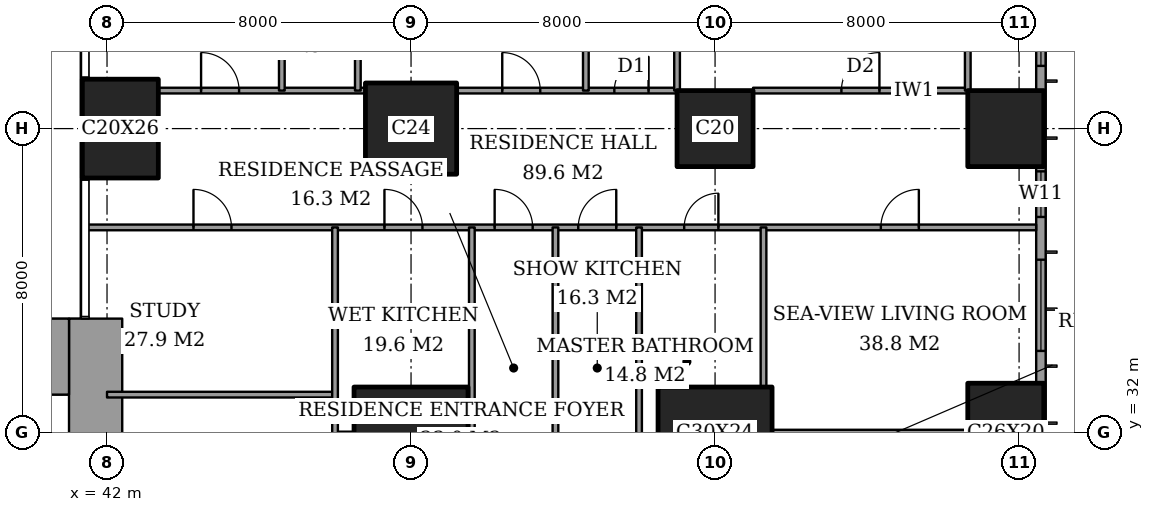
"""IFC4 building model, lengths in metres.
Left out: names, types, materials, properties, quantities, classifications, styles, units other than length and angle.
Written with IfcOpenShell. Run it as: python <this file> out.ifc"""

import sys

from ifc_helpers import new_model, si_unit, direction, frame, frame_2d, origin, origin_2d, place, context, subcontext, project, spatial, rectangle, extrude, element, fill, save


model = new_model("IFC4")
c1 = context("Model", 3, precision=1e-05, world=origin(), true_north=direction((0.0, 1.0)))
c2 = subcontext(c1, "Body", "Model", "MODEL_VIEW")
j1 = project(units=[si_unit("LENGTHUNIT", "METRE"), si_unit("PLANEANGLEUNIT", "RADIAN")], contexts=[c1])
p1 = place(None, origin())
s1 = spatial("IfcSite", under=j1, at=p1, CompositionType="ELEMENT")
p2 = place(p1, origin())
s2 = spatial("IfcBuilding", under=s1, at=p2, CompositionType="ELEMENT")
p3 = place(p2, frame((0.0, 0.0, 107.0)))
s3 = spatial("IfcBuildingStorey", under=s2, at=p3, CompositionType="ELEMENT", Elevation=107.0)
p4 = place(p3, frame((42.35, 40.0, 0.0), z_axis=(0.0, 0.0, 1.0), x_axis=(1.0, 0.0, 0.0)))
e1 = element("IfcColumn", 1, at=p4, inside=s3, PredefinedType="COLUMN", context=c2, shape_type="SweptSolid", body=[
    extrude(rectangle(XDim=2.0, YDim=2.6, at=origin_2d()), origin(), (0.0, 0.0, 1.0), 3.6),
])
p5 = place(p3, frame((50.0, 32.0, 0.0), z_axis=(0.0, 0.0, 1.0), x_axis=(1.0, 0.0, 0.0)))
e2 = element("IfcColumn", 2, at=p5, inside=s3, PredefinedType="COLUMN", context=c2, shape_type="SweptSolid", body=[
    extrude(rectangle(XDim=3.0, YDim=2.4, at=origin_2d()), origin(), (0.0, 0.0, 1.0), 3.6),
])
p6 = place(p3, frame((50.0, 40.0, 0.0), z_axis=(0.0, 0.0, 1.0), x_axis=(1.0, 0.0, 0.0)))
e3 = element("IfcColumn", 3, at=p6, inside=s3, PredefinedType="COLUMN", context=c2, shape_type="SweptSolid", body=[
    extrude(rectangle(XDim=2.4, YDim=2.4, at=origin_2d()), origin(), (0.0, 0.0, 1.0), 3.6),
])
p7 = place(p3, frame((58.0, 32.0, 0.0), z_axis=(0.0, 0.0, 1.0), x_axis=(1.0, 0.0, 0.0)))
e4 = element("IfcColumn", 4, at=p7, inside=s3, PredefinedType="COLUMN", context=c2, shape_type="SweptSolid", body=[
    extrude(rectangle(XDim=3.0, YDim=2.4, at=origin_2d()), origin(), (0.0, 0.0, 1.0), 3.6),
])
p8 = place(p3, frame((58.0, 40.0, 0.0), z_axis=(0.0, 0.0, 1.0), x_axis=(1.0, 0.0, 0.0)))
e5 = element("IfcColumn", 5, at=p8, inside=s3, PredefinedType="COLUMN", context=c2, shape_type="SweptSolid", body=[
    extrude(rectangle(XDim=2.0, YDim=2.0, at=origin_2d()), origin(), (0.0, 0.0, 1.0), 3.6),
])
p9 = place(p3, frame((65.65, 32.0, 0.0), z_axis=(0.0, 0.0, 1.0), x_axis=(0.0, 1.0, 0.0)))
e6 = element("IfcColumn", 6, at=p9, inside=s3, PredefinedType="COLUMN", context=c2, shape_type="SweptSolid", body=[
    extrude(rectangle(XDim=2.6, YDim=2.0, at=origin_2d()), origin(), (0.0, 0.0, 1.0), 3.6),
])
p10 = place(p3, frame((65.65, 40.0, 0.0), z_axis=(0.0, 0.0, 1.0), x_axis=(1.0, 0.0, 0.0)))
e7 = element("IfcColumn", 7, at=p10, inside=s3, PredefinedType="COLUMN", context=c2, shape_type="SweptSolid", body=[
    extrude(rectangle(XDim=2.0, YDim=2.0, at=origin_2d()), origin(), (0.0, 0.0, 1.0), 3.6),
])
p11 = place(p3, frame((37.85, 34.0, 0.0), z_axis=(0.0, 0.0, 1.0), x_axis=(1.0, 0.0, 0.0)))
e8 = element("IfcWall", 8, at=p11, inside=s3, PredefinedType="SHEAR", context=c2, shape_type="SweptSolid", body=[
    extrude(rectangle(XDim=3.15, YDim=2.0, at=frame_2d((1.575, 0.0))), origin(), (0.0, 0.0, 1.0), 3.6),
])
p12 = place(p3, frame((41.7, 24.85, 0.0), z_axis=(0.0, 0.0, 1.0), x_axis=(0.0, 1.0, 0.0)))
e9 = element("IfcWall", 9, at=p12, inside=s3, PredefinedType="SHEAR", context=c2, shape_type="SweptSolid", body=[
    extrude(rectangle(XDim=10.15, YDim=1.4, at=frame_2d((5.075, 0.0))), origin(), (0.0, 0.0, 1.0), 3.6),
])
p13 = place(p3, frame((66.575, 3.175, 0.0), z_axis=(0.0, 0.0, 1.0), x_axis=(0.0, 1.0, 0.0)))
e10 = element("IfcWall", 10, at=p13, inside=s3, PredefinedType="SOLIDWALL", context=c2, shape_type="SweptSolid", body=[
    extrude(rectangle(XDim=41.65, YDim=0.25, at=frame_2d((20.825, 0.0))), origin(), (0.0, 0.0, 1.0), 3.6),
])
p14 = place(p13, frame((0.775, 0.0, 0.4)))
e11 = element("IfcOpeningElement", 11, at=p14, cuts=e10, PredefinedType="OPENING", context=c2, shape_type="SweptSolid", body=[
    extrude(rectangle(XDim=2.4, YDim=2.2, at=frame_2d((1.2, 1.1))), frame((0.0, 0.135, 0.0), z_axis=(0.0, -1.0, 0.0), x_axis=(1.0, 0.0, 0.0)), (0.0, 0.0, 1.0), 0.27),
])
p15 = place(p13, frame((6.1, 0.0, 0.4)))
e12 = element("IfcOpeningElement", 12, at=p15, cuts=e10, PredefinedType="OPENING", context=c2, shape_type="SweptSolid", body=[
    extrude(rectangle(XDim=1.2, YDim=2.2, at=frame_2d((0.6, 1.1))), frame((0.0, 0.135, 0.0), z_axis=(0.0, -1.0, 0.0), x_axis=(1.0, 0.0, 0.0)), (0.0, 0.0, 1.0), 0.27),
])
p16 = place(p13, frame((8.275, 0.0, 0.4)))
e13 = element("IfcOpeningElement", 13, at=p16, cuts=e10, PredefinedType="OPENING", context=c2, shape_type="SweptSolid", body=[
    extrude(rectangle(XDim=2.4, YDim=2.2, at=frame_2d((1.2, 1.1))), frame((0.0, 0.135, 0.0), z_axis=(0.0, -1.0, 0.0), x_axis=(1.0, 0.0, 0.0)), (0.0, 0.0, 1.0), 0.27),
])
p17 = place(p13, frame((15.775, 0.0, 0.4)))
e14 = element("IfcOpeningElement", 14, at=p17, cuts=e10, PredefinedType="OPENING", context=c2, shape_type="SweptSolid", body=[
    extrude(rectangle(XDim=2.4, YDim=2.2, at=frame_2d((1.2, 1.1))), frame((0.0, 0.135, 0.0), z_axis=(0.0, -1.0, 0.0), x_axis=(1.0, 0.0, 0.0)), (0.0, 0.0, 1.0), 0.27),
])
p18 = place(p13, frame((23.475, 0.0, 0.4)))
e15 = element("IfcOpeningElement", 15, at=p18, cuts=e10, PredefinedType="OPENING", context=c2, shape_type="SweptSolid", body=[
    extrude(rectangle(XDim=2.4, YDim=2.2, at=frame_2d((1.2, 1.1))), frame((0.0, 0.135, 0.0), z_axis=(0.0, -1.0, 0.0), x_axis=(1.0, 0.0, 0.0)), (0.0, 0.0, 1.0), 0.27),
])
p19 = place(p13, frame((30.975, 0.0, 0.4)))
e16 = element("IfcOpeningElement", 16, at=p19, cuts=e10, PredefinedType="OPENING", context=c2, shape_type="SweptSolid", body=[
    extrude(rectangle(XDim=2.4, YDim=2.2, at=frame_2d((1.2, 1.1))), frame((0.0, 0.135, 0.0), z_axis=(0.0, -1.0, 0.0), x_axis=(1.0, 0.0, 0.0)), (0.0, 0.0, 1.0), 0.27),
])
p20 = place(p13, frame((34.5, 0.0, 0.4)))
e17 = element("IfcOpeningElement", 17, at=p20, cuts=e10, PredefinedType="OPENING", context=c2, shape_type="SweptSolid", body=[
    extrude(rectangle(XDim=1.2, YDim=2.2, at=frame_2d((0.6, 1.1))), frame((0.0, 0.135, 0.0), z_axis=(0.0, -1.0, 0.0), x_axis=(1.0, 0.0, 0.0)), (0.0, 0.0, 1.0), 0.27),
])
p21 = place(p13, frame((38.475, 0.0, 0.4)))
e18 = element("IfcOpeningElement", 18, at=p21, cuts=e10, PredefinedType="OPENING", context=c2, shape_type="SweptSolid", body=[
    extrude(rectangle(XDim=2.4, YDim=2.2, at=frame_2d((1.2, 1.1))), frame((0.0, 0.135, 0.0), z_axis=(0.0, -1.0, 0.0), x_axis=(1.0, 0.0, 0.0)), (0.0, 0.0, 1.0), 0.27),
])
p22 = place(p3, frame((48.0, 31.95, 0.0), z_axis=(0.0, 0.0, 1.0), x_axis=(1.0, 0.0, 0.0)))
e19 = element("IfcWall", 19, at=p22, inside=s3, PredefinedType="PARTITIONING", context=c2, shape_type="SweptSolid", body=[
    extrude(rectangle(XDim=0.5, YDim=0.15, at=frame_2d((0.25, 0.0))), origin(), (0.0, 0.0, 1.0), 2.634),
])
p23 = place(p3, frame((59.5, 32.0, 0.0), z_axis=(0.0, 0.0, 1.0), x_axis=(1.0, 0.0, 0.0)))
e20 = element("IfcWall", 20, at=p23, inside=s3, PredefinedType="PARTITIONING", context=c2, shape_type="SweptSolid", body=[
    extrude(rectangle(XDim=5.15, YDim=0.15, at=frame_2d((2.575, 0.0))), origin(), (0.0, 0.0, 1.0), 2.634),
])
p24 = place(p3, frame((42.0, 33.0, 0.0), z_axis=(0.0, 0.0, 1.0), x_axis=(1.0, 0.0, 0.0)))
e21 = element("IfcWall", 21, at=p24, inside=s3, PredefinedType="PARTITIONING", context=c2, shape_type="SweptSolid", body=[
    extrude(rectangle(XDim=6.0, YDim=0.15, at=frame_2d((3.0, 0.0))), origin(), (0.0, 0.0, 1.0), 3.35),
])
p25 = place(p3, frame((41.439, 37.4, 0.0), z_axis=(0.0, 0.0, 1.0), x_axis=(1.0, 0.0, 0.0)))
e22 = element("IfcWall", 22, at=p25, inside=s3, PredefinedType="PARTITIONING", context=c2, shape_type="SweptSolid", body=[
    extrude(rectangle(XDim=25.011, YDim=0.15, at=frame_2d((12.505, 0.0))), origin(), (0.0, 0.0, 1.0), 3.35),
])
p26 = place(p25, frame((10.761, 0.0, 0.0)))
e23 = element("IfcOpeningElement", 23, at=p26, cuts=e22, PredefinedType="OPENING", context=c2, shape_type="SweptSolid", body=[
    extrude(rectangle(XDim=1.0, YDim=2.1, at=frame_2d((0.5, 1.05))), frame((0.0, 0.085, 0.0), z_axis=(0.0, -1.0, 0.0), x_axis=(1.0, 0.0, 0.0)), (0.0, 0.0, 1.0), 0.17),
])
p27 = place(p25, frame((20.924, 0.0, 0.0)))
e24 = element("IfcOpeningElement", 24, at=p27, cuts=e22, PredefinedType="OPENING", context=c2, shape_type="SweptSolid", body=[
    extrude(rectangle(XDim=1.0, YDim=2.1, at=frame_2d((0.5, 1.05))), frame((0.0, 0.085, 0.0), z_axis=(0.0, -1.0, 0.0), x_axis=(1.0, 0.0, 0.0)), (0.0, 0.0, 1.0), 0.17),
])
p28 = place(p25, frame((15.749, 0.0, 0.0)))
e25 = element("IfcOpeningElement", 25, at=p28, cuts=e22, PredefinedType="OPENING", context=c2, shape_type="SweptSolid", body=[
    extrude(rectangle(XDim=0.9, YDim=2.1, at=frame_2d((0.45, 1.05))), frame((0.0, 0.085, 0.0), z_axis=(0.0, -1.0, 0.0), x_axis=(1.0, 0.0, 0.0)), (0.0, 0.0, 1.0), 0.17),
])
p29 = place(p25, frame((12.961, 0.0, 0.0)))
e26 = element("IfcOpeningElement", 26, at=p29, cuts=e22, PredefinedType="OPENING", context=c2, shape_type="SweptSolid", body=[
    extrude(rectangle(XDim=1.0, YDim=2.1, at=frame_2d((0.5, 1.05))), frame((0.0, 0.085, 0.0), z_axis=(0.0, -1.0, 0.0), x_axis=(1.0, 0.0, 0.0)), (0.0, 0.0, 1.0), 0.17),
])
p30 = place(p25, frame((7.861, 0.0, 0.0)))
e27 = element("IfcOpeningElement", 27, at=p30, cuts=e22, PredefinedType="OPENING", context=c2, shape_type="SweptSolid", body=[
    extrude(rectangle(XDim=1.0, YDim=2.1, at=frame_2d((0.5, 1.05))), frame((0.0, 0.085, 0.0), z_axis=(0.0, -1.0, 0.0), x_axis=(1.0, 0.0, 0.0)), (0.0, 0.0, 1.0), 0.17),
])
p31 = place(p25, frame((2.836, 0.0, 0.0)))
e28 = element("IfcOpeningElement", 28, at=p31, cuts=e22, PredefinedType="OPENING", context=c2, shape_type="SweptSolid", body=[
    extrude(rectangle(XDim=1.0, YDim=2.1, at=frame_2d((0.5, 1.05))), frame((0.0, 0.085, 0.0), z_axis=(0.0, -1.0, 0.0), x_axis=(1.0, 0.0, 0.0)), (0.0, 0.0, 1.0), 0.17),
])
p32 = place(p3, frame((43.35, 41.0, 0.0), z_axis=(0.0, 0.0, 1.0), x_axis=(1.0, 0.0, 0.0)))
e29 = element("IfcWall", 29, at=p32, inside=s3, PredefinedType="PARTITIONING", context=c2, shape_type="SweptSolid", body=[
    extrude(rectangle(XDim=5.45, YDim=0.15, at=frame_2d((2.725, 0.0))), origin(), (0.0, 0.0, 1.0), 3.35),
])
p33 = place(p32, frame((1.125, 0.0, 0.0)))
e30 = element("IfcOpeningElement", 30, at=p33, cuts=e29, PredefinedType="OPENING", context=c2, shape_type="SweptSolid", body=[
    extrude(rectangle(XDim=1.0, YDim=2.1, at=frame_2d((0.5, 1.05))), frame((0.0, 0.085, 0.0), z_axis=(0.0, -1.0, 0.0), x_axis=(1.0, 0.0, 0.0)), (0.0, 0.0, 1.0), 0.17),
])
p34 = place(p3, frame((51.2, 41.0, 0.0), z_axis=(0.0, 0.0, 1.0), x_axis=(1.0, 0.0, 0.0)))
e31 = element("IfcWall", 31, at=p34, inside=s3, PredefinedType="PARTITIONING", context=c2, shape_type="SweptSolid", body=[
    extrude(rectangle(XDim=5.8, YDim=0.15, at=frame_2d((2.9, 0.0))), origin(), (0.0, 0.0, 1.0), 3.35),
])
p35 = place(p34, frame((4.15, 0.0, 0.0)))
e32 = element("IfcOpeningElement", 32, at=p35, cuts=e31, PredefinedType="OPENING", context=c2, shape_type="SweptSolid", body=[
    extrude(rectangle(XDim=0.9, YDim=2.1, at=frame_2d((0.45, 1.05))), frame((0.0, 0.085, 0.0), z_axis=(0.0, -1.0, 0.0), x_axis=(1.0, 0.0, 0.0)), (0.0, 0.0, 1.0), 0.17),
])
p36 = place(p34, frame((1.2, 0.0, 0.0)))
e33 = element("IfcOpeningElement", 33, at=p36, cuts=e31, PredefinedType="OPENING", context=c2, shape_type="SweptSolid", body=[
    extrude(rectangle(XDim=1.0, YDim=2.1, at=frame_2d((0.5, 1.05))), frame((0.0, 0.085, 0.0), z_axis=(0.0, -1.0, 0.0), x_axis=(1.0, 0.0, 0.0)), (0.0, 0.0, 1.0), 0.17),
])
p37 = place(p3, frame((59.0, 41.0, 0.0), z_axis=(0.0, 0.0, 1.0), x_axis=(1.0, 0.0, 0.0)))
e34 = element("IfcWall", 34, at=p37, inside=s3, PredefinedType="PARTITIONING", context=c2, shape_type="SweptSolid", body=[
    extrude(rectangle(XDim=5.65, YDim=0.15, at=frame_2d((2.825, 0.0))), origin(), (0.0, 0.0, 1.0), 3.35),
])
p38 = place(p37, frame((2.325, 0.0, 0.0)))
e35 = element("IfcOpeningElement", 35, at=p38, cuts=e34, PredefinedType="OPENING", context=c2, shape_type="SweptSolid", body=[
    extrude(rectangle(XDim=1.0, YDim=2.1, at=frame_2d((0.5, 1.05))), frame((0.0, 0.085, 0.0), z_axis=(0.0, -1.0, 0.0), x_axis=(1.0, 0.0, 0.0)), (0.0, 0.0, 1.0), 0.17),
])
p39 = place(p3, frame((46.6, 41.0, 0.0), z_axis=(0.0, 0.0, 1.0), x_axis=(0.0, 1.0, 0.0)))
e36 = element("IfcWall", 36, at=p39, inside=s3, PredefinedType="PARTITIONING", context=c2, shape_type="SweptSolid", body=[
    extrude(rectangle(XDim=7.45, YDim=0.15, at=frame_2d((3.725, 0.0))), origin(), (0.0, 0.0, 1.0), 3.35),
])
p40 = place(p39, frame((3.275, 0.0, 0.0)))
e37 = element("IfcOpeningElement", 37, at=p40, cuts=e36, PredefinedType="OPENING", context=c2, shape_type="SweptSolid", body=[
    extrude(rectangle(XDim=0.9, YDim=2.1, at=frame_2d((0.45, 1.05))), frame((0.0, 0.085, 0.0), z_axis=(0.0, -1.0, 0.0), x_axis=(1.0, 0.0, 0.0)), (0.0, 0.0, 1.0), 0.17),
])
p41 = place(p3, frame((48.0, 28.0, 0.0), z_axis=(0.0, 0.0, 1.0), x_axis=(0.0, 1.0, 0.0)))
e38 = element("IfcWall", 38, at=p41, inside=s3, PredefinedType="PARTITIONING", context=c2, shape_type="SweptSolid", body=[
    extrude(rectangle(XDim=9.4, YDim=0.15, at=frame_2d((4.7, 0.0))), origin(), (0.0, 0.0, 1.0), 3.35),
])
p42 = place(p41, frame((0.55, 0.0, 0.0)))
e39 = element("IfcOpeningElement", 39, at=p42, cuts=e38, PredefinedType="OPENING", context=c2, shape_type="SweptSolid", body=[
    extrude(rectangle(XDim=0.9, YDim=2.1, at=frame_2d((0.45, 1.05))), frame((0.0, 0.085, 0.0), z_axis=(0.0, -1.0, 0.0), x_axis=(1.0, 0.0, 0.0)), (0.0, 0.0, 1.0), 0.17),
])
p43 = place(p3, frame((48.6, 41.0, 0.0), z_axis=(0.0, 0.0, 1.0), x_axis=(0.0, 1.0, 0.0)))
e40 = element("IfcWall", 40, at=p43, inside=s3, PredefinedType="PARTITIONING", context=c2, shape_type="SweptSolid", body=[
    extrude(rectangle(XDim=7.45, YDim=0.15, at=frame_2d((3.725, 0.0))), origin(), (0.0, 0.0, 1.0), 3.35),
])
for number, where, z_axis, x_axis in (
    (41, (51.6, 30.0, 0.0), (0.0, 0.0, 1.0), (0.0, 1.0, 0.0)),
    (42, (53.8, 30.0, 0.0), (0.0, 0.0, 1.0), (0.0, 1.0, 0.0)),
):
    element("IfcWall", number, at=place(p3, frame(where, z_axis=z_axis, x_axis=x_axis)), inside=s3, PredefinedType="PARTITIONING", context=c2, shape_type="SweptSolid", body=[
        extrude(rectangle(XDim=7.4, YDim=0.15, at=frame_2d((3.7, 0.0))), origin(), (0.0, 0.0, 1.0), 3.35),
    ])
p44 = place(p3, frame((54.6, 41.0, 0.0), z_axis=(0.0, 0.0, 1.0), x_axis=(0.0, 1.0, 0.0)))
e43 = element("IfcWall", 43, at=p44, inside=s3, PredefinedType="PARTITIONING", context=c2, shape_type="SweptSolid", body=[
    extrude(rectangle(XDim=7.45, YDim=0.15, at=frame_2d((3.725, 0.0))), origin(), (0.0, 0.0, 1.0), 3.35),
])
p45 = place(p3, frame((56.0, 28.0, 0.0), z_axis=(0.0, 0.0, 1.0), x_axis=(0.0, 1.0, 0.0)))
e44 = element("IfcWall", 44, at=p45, inside=s3, PredefinedType="PARTITIONING", context=c2, shape_type="SweptSolid", body=[
    extrude(rectangle(XDim=9.4, YDim=0.15, at=frame_2d((4.7, 0.0))), origin(), (0.0, 0.0, 1.0), 3.35),
])
p46 = place(p45, frame((0.5, 0.0, 0.0)))
e45 = element("IfcOpeningElement", 45, at=p46, cuts=e44, PredefinedType="OPENING", context=c2, shape_type="SweptSolid", body=[
    extrude(rectangle(XDim=1.0, YDim=2.1, at=frame_2d((0.5, 1.05))), frame((0.0, 0.085, 0.0), z_axis=(0.0, -1.0, 0.0), x_axis=(1.0, 0.0, 0.0)), (0.0, 0.0, 1.0), 0.17),
])
p47 = place(p3, frame((57.0, 41.0, 0.0), z_axis=(0.0, 0.0, 1.0), x_axis=(0.0, 1.0, 0.0)))
e46 = element("IfcWall", 46, at=p47, inside=s3, PredefinedType="PARTITIONING", context=c2, shape_type="SweptSolid", body=[
    extrude(rectangle(XDim=5.65, YDim=0.15, at=frame_2d((2.825, 0.0))), origin(), (0.0, 0.0, 1.0), 3.35),
])
p48 = place(p3, frame((59.275, 33.2, 0.0), z_axis=(0.0, 0.0, 1.0), x_axis=(0.0, 1.0, 0.0)))
e47 = element("IfcWall", 47, at=p48, inside=s3, PredefinedType="PARTITIONING", context=c2, shape_type="SweptSolid", body=[
    extrude(rectangle(XDim=4.2, YDim=0.15, at=frame_2d((2.1, 0.0))), origin(), (0.0, 0.0, 1.0), 3.35),
])
p49 = place(p3, frame((64.65, 41.0, 0.0), z_axis=(0.0, 0.0, 1.0), x_axis=(0.0, 1.0, 0.0)))
e48 = element("IfcWall", 48, at=p49, inside=s3, PredefinedType="PARTITIONING", context=c2, shape_type="SweptSolid", body=[
    extrude(rectangle(XDim=3.7, YDim=0.15, at=frame_2d((1.85, 0.0))), origin(), (0.0, 0.0, 1.0), 3.35),
])
p50 = place(p49, frame((1.4, 0.0, 0.0)))
e49 = element("IfcOpeningElement", 49, at=p50, cuts=e48, PredefinedType="OPENING", context=c2, shape_type="SweptSolid", body=[
    extrude(rectangle(XDim=0.9, YDim=2.1, at=frame_2d((0.45, 1.05))), frame((0.0, 0.085, 0.0), z_axis=(0.0, -1.0, 0.0), x_axis=(1.0, 0.0, 0.0)), (0.0, 0.0, 1.0), 0.17),
])
p51 = place(p19, origin())
e50 = element("IfcWindow", 50, at=p51, inside=s3, PartitioningType="SINGLE_PANEL", PredefinedType="WINDOW", context=c2, shape_type="SweptSolid", body=[
    extrude(rectangle(XDim=2.4, YDim=2.2, at=frame_2d((1.2, 1.1))), frame((0.0, 0.03, 0.0), z_axis=(0.0, -1.0, 0.0), x_axis=(1.0, 0.0, 0.0)), (0.0, 0.0, 1.0), 0.06),
])
fill(e16, e50)
p52 = place(p20, origin())
e51 = element("IfcWindow", 51, at=p52, inside=s3, PartitioningType="SINGLE_PANEL", PredefinedType="WINDOW", context=c2, shape_type="SweptSolid", body=[
    extrude(rectangle(XDim=1.2, YDim=2.2, at=frame_2d((0.6, 1.1))), frame((0.0, 0.03, 0.0), z_axis=(0.0, -1.0, 0.0), x_axis=(1.0, 0.0, 0.0)), (0.0, 0.0, 1.0), 0.06),
])
fill(e17, e51)
p53 = place(p21, origin())
e52 = element("IfcWindow", 52, at=p53, inside=s3, PartitioningType="SINGLE_PANEL", PredefinedType="WINDOW", context=c2, shape_type="SweptSolid", body=[
    extrude(rectangle(XDim=2.4, YDim=2.2, at=frame_2d((1.2, 1.1))), frame((0.0, 0.03, 0.0), z_axis=(0.0, -1.0, 0.0), x_axis=(1.0, 0.0, 0.0)), (0.0, 0.0, 1.0), 0.06),
])
fill(e18, e52)
p54 = place(p38, origin())
e53 = element("IfcDoor", 53, at=p54, inside=s3, OperationType="SINGLE_SWING_LEFT", PredefinedType="DOOR", context=c2, shape_type="SweptSolid", body=[
    extrude(rectangle(XDim=1.0, YDim=2.1, at=frame_2d((0.5, 1.05))), frame((0.0, 0.025, 0.0), z_axis=(0.0, -1.0, 0.0), x_axis=(1.0, 0.0, 0.0)), (0.0, 0.0, 1.0), 0.05),
])
fill(e35, e53)
p55 = place(p35, origin())
e54 = element("IfcDoor", 54, at=p55, inside=s3, OperationType="SINGLE_SWING_LEFT", PredefinedType="DOOR", context=c2, shape_type="SweptSolid", body=[
    extrude(rectangle(XDim=0.9, YDim=2.1, at=frame_2d((0.45, 1.05))), frame((0.0, 0.025, 0.0), z_axis=(0.0, -1.0, 0.0), x_axis=(1.0, 0.0, 0.0)), (0.0, 0.0, 1.0), 0.05),
])
fill(e32, e54)
p56 = place(p36, origin())
e55 = element("IfcDoor", 55, at=p56, inside=s3, OperationType="SINGLE_SWING_RIGHT", PredefinedType="DOOR", context=c2, shape_type="SweptSolid", body=[
    extrude(rectangle(XDim=1.0, YDim=2.1, at=frame_2d((0.5, 1.05))), frame((0.0, 0.025, 0.0), z_axis=(0.0, -1.0, 0.0), x_axis=(1.0, 0.0, 0.0)), (0.0, 0.0, 1.0), 0.05),
])
fill(e33, e55)
p57 = place(p33, origin())
e56 = element("IfcDoor", 56, at=p57, inside=s3, OperationType="SINGLE_SWING_RIGHT", PredefinedType="DOOR", context=c2, shape_type="SweptSolid", body=[
    extrude(rectangle(XDim=1.0, YDim=2.1, at=frame_2d((0.5, 1.05))), frame((0.0, 0.025, 0.0), z_axis=(0.0, -1.0, 0.0), x_axis=(1.0, 0.0, 0.0)), (0.0, 0.0, 1.0), 0.05),
])
fill(e30, e56)
p58 = place(p26, origin())
e57 = element("IfcDoor", 57, at=p58, inside=s3, OperationType="SINGLE_SWING_RIGHT", PredefinedType="DOOR", context=c2, shape_type="SweptSolid", body=[
    extrude(rectangle(XDim=1.0, YDim=2.1, at=frame_2d((0.5, 1.05))), frame((0.0, 0.025, 0.0), z_axis=(0.0, -1.0, 0.0), x_axis=(1.0, 0.0, 0.0)), (0.0, 0.0, 1.0), 0.05),
])
fill(e23, e57)
p59 = place(p27, origin())
e58 = element("IfcDoor", 58, at=p59, inside=s3, OperationType="SINGLE_SWING_LEFT", PredefinedType="DOOR", context=c2, shape_type="SweptSolid", body=[
    extrude(rectangle(XDim=1.0, YDim=2.1, at=frame_2d((0.5, 1.05))), frame((0.0, 0.025, 0.0), z_axis=(0.0, -1.0, 0.0), x_axis=(1.0, 0.0, 0.0)), (0.0, 0.0, 1.0), 0.05),
])
fill(e24, e58)
p60 = place(p28, origin())
e59 = element("IfcDoor", 59, at=p60, inside=s3, OperationType="SINGLE_SWING_LEFT", PredefinedType="DOOR", context=c2, shape_type="SweptSolid", body=[
    extrude(rectangle(XDim=0.9, YDim=2.1, at=frame_2d((0.45, 1.05))), frame((0.0, 0.025, 0.0), z_axis=(0.0, -1.0, 0.0), x_axis=(1.0, 0.0, 0.0)), (0.0, 0.0, 1.0), 0.05),
])
fill(e25, e59)
p61 = place(p29, origin())
e60 = element("IfcDoor", 60, at=p61, inside=s3, OperationType="SINGLE_SWING_LEFT", PredefinedType="DOOR", context=c2, shape_type="SweptSolid", body=[
    extrude(rectangle(XDim=1.0, YDim=2.1, at=frame_2d((0.5, 1.05))), frame((0.0, 0.025, 0.0), z_axis=(0.0, -1.0, 0.0), x_axis=(1.0, 0.0, 0.0)), (0.0, 0.0, 1.0), 0.05),
])
fill(e26, e60)
p62 = place(p30, origin())
e61 = element("IfcDoor", 61, at=p62, inside=s3, OperationType="SINGLE_SWING_RIGHT", PredefinedType="DOOR", context=c2, shape_type="SweptSolid", body=[
    extrude(rectangle(XDim=1.0, YDim=2.1, at=frame_2d((0.5, 1.05))), frame((0.0, 0.025, 0.0), z_axis=(0.0, -1.0, 0.0), x_axis=(1.0, 0.0, 0.0)), (0.0, 0.0, 1.0), 0.05),
])
fill(e27, e61)
p63 = place(p31, origin())
e62 = element("IfcDoor", 62, at=p63, inside=s3, OperationType="SINGLE_SWING_RIGHT", PredefinedType="DOOR", context=c2, shape_type="SweptSolid", body=[
    extrude(rectangle(XDim=1.0, YDim=2.1, at=frame_2d((0.5, 1.05))), frame((0.0, 0.025, 0.0), z_axis=(0.0, -1.0, 0.0), x_axis=(1.0, 0.0, 0.0)), (0.0, 0.0, 1.0), 0.05),
])
fill(e28, e62)
save(model, sys.argv[1])
